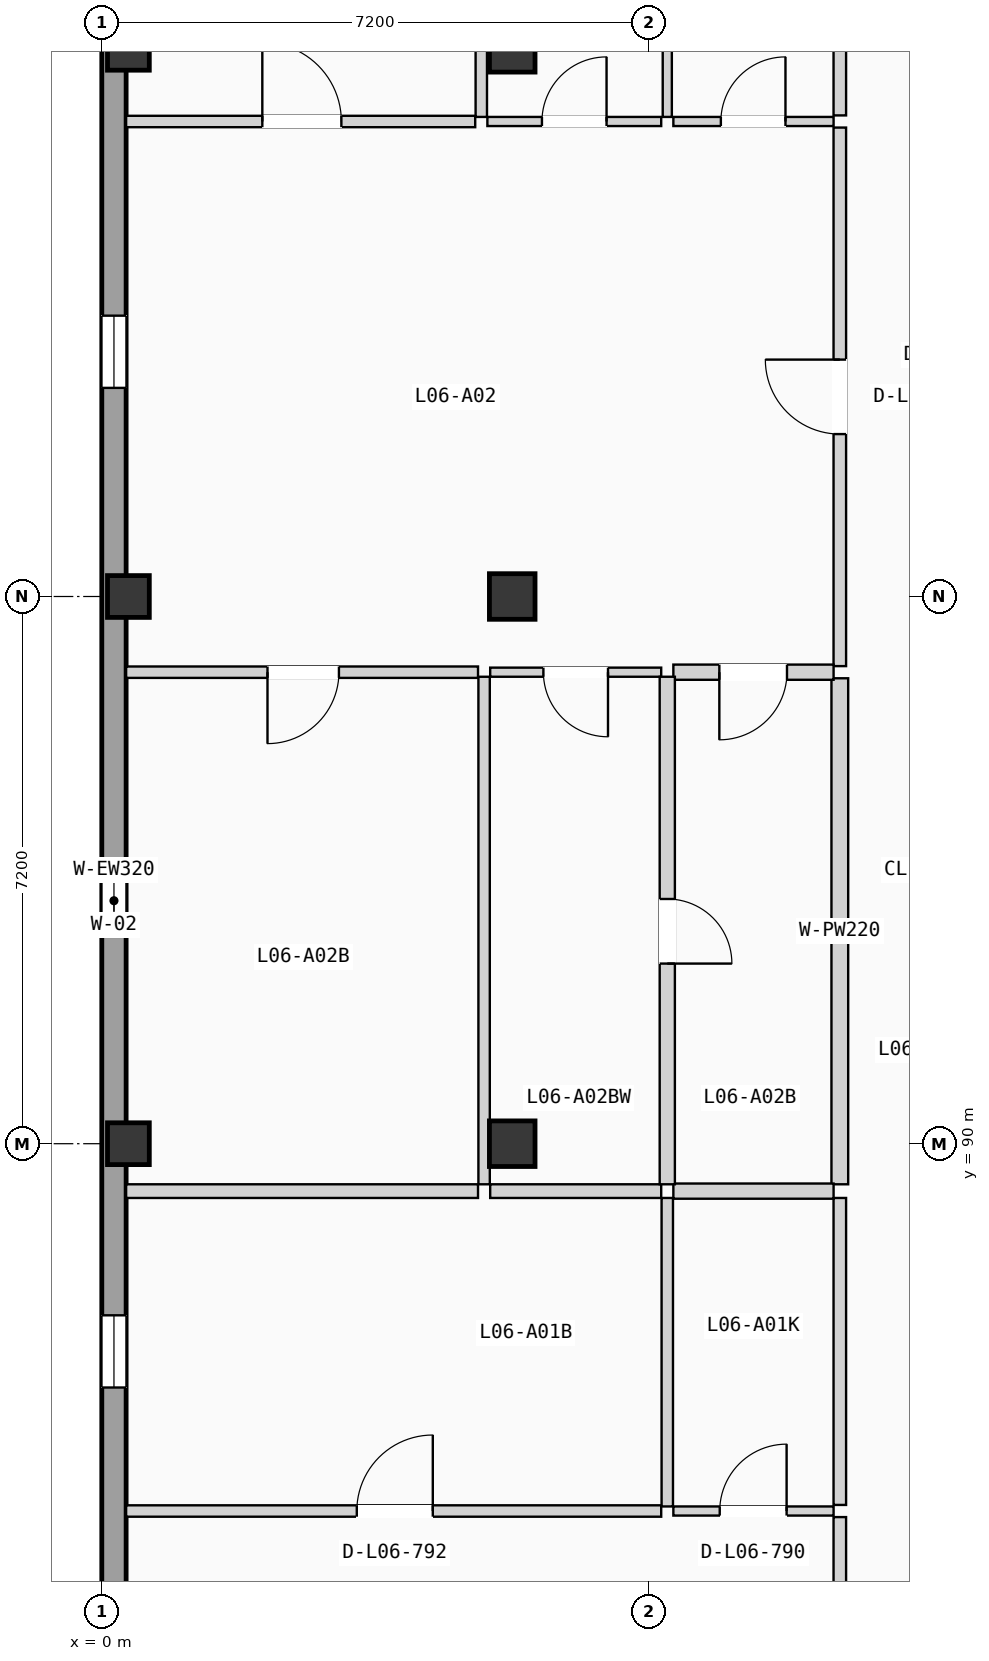
"""IFC4 building model, lengths in metres.
Left out: names, types, materials, properties, quantities, classifications, styles, units other than length and angle.
Written with IfcOpenShell. Run it as: python <this file> out.ifc"""

import sys

from ifc_helpers import new_model, si_unit, direction, frame, frame_2d, origin, origin_2d, place, context, subcontext, project, spatial, rectangle, extrude, element, fill, save


model = new_model("IFC4")
c1 = context("Model", 3, precision=1e-05, world=origin(), true_north=direction((0.0, 1.0)))
c2 = subcontext(c1, "Body", "Model", "MODEL_VIEW")
j1 = project(units=[si_unit("LENGTHUNIT", "METRE"), si_unit("PLANEANGLEUNIT", "RADIAN")], contexts=[c1])
p1 = place(None, origin())
s1 = spatial("IfcSite", under=j1, at=p1, CompositionType="ELEMENT")
p2 = place(p1, origin())
s2 = spatial("IfcBuilding", under=s1, at=p2, CompositionType="ELEMENT")
p3 = place(p2, frame((0.0, 0.0, 21.525)))
s3 = spatial("IfcBuildingStorey", under=s2, at=p3, CompositionType="ELEMENT", Elevation=21.525)
for number, where, z_axis, x_axis in (
    (1, (0.35, 90.0, 0.0), (0.0, 0.0, 1.0), (1.0, 0.0, 0.0)),
    (2, (0.35, 97.2, 0.0), (0.0, 0.0, 1.0), (1.0, 0.0, 0.0)),
    (3, (0.35, 104.4, 0.0), (0.0, 0.0, 1.0), (1.0, 0.0, 0.0)),
):
    element("IfcColumn", number, at=place(p3, frame(where, z_axis=z_axis, x_axis=x_axis)), inside=s3, PredefinedType="COLUMN", context=c2, shape_type="SweptSolid", body=[
        extrude(rectangle(XDim=0.55, YDim=0.55, at=origin_2d()), origin(), (0.0, 0.0, 1.0), 3.15),
    ])
for number, where, z_axis, x_axis in (
    (4, (5.4, 90.0, 0.0), (0.0, 0.0, 1.0), (1.0, 0.0, 0.0)),
    (5, (5.4, 97.2, 0.0), (0.0, 0.0, 1.0), (1.0, 0.0, 0.0)),
    (6, (5.4, 104.4, 0.0), (0.0, 0.0, 1.0), (1.0, 0.0, 0.0)),
):
    element("IfcColumn", number, at=place(p3, frame(where, z_axis=z_axis, x_axis=x_axis)), inside=s3, PredefinedType="COLUMN", context=c2, shape_type="SweptSolid", body=[
        extrude(rectangle(XDim=0.6, YDim=0.6, at=origin_2d()), origin(), (0.0, 0.0, 1.0), 3.15),
    ])
p4 = place(p3, frame((0.16, 68.72, 0.0), z_axis=(0.0, 0.0, 1.0), x_axis=(0.0, 1.0, 0.0)))
e7 = element("IfcWall", 7, at=p4, inside=s3, PredefinedType="SOLIDWALL", context=c2, shape_type="SweptSolid", body=[
    extrude(rectangle(XDim=49.76, YDim=0.32, at=frame_2d((24.88, 0.0))), origin(), (0.0, 0.0, 1.0), 2.89),
])
p5 = place(p4, frame((12.169, 0.0, 0.85)))
e8 = element("IfcOpeningElement", 8, at=p5, cuts=e7, PredefinedType="OPENING", context=c2, shape_type="SweptSolid", body=[
    extrude(rectangle(XDim=0.95, YDim=1.2, at=frame_2d((0.475, 0.6))), frame((0.0, 0.17, 0.0), z_axis=(0.0, -1.0, 0.0), x_axis=(1.0, 0.0, 0.0)), (0.0, 0.0, 1.0), 0.34),
])
p6 = place(p4, frame((8.149, 0.0, 0.555)))
e9 = element("IfcOpeningElement", 9, at=p6, cuts=e7, PredefinedType="OPENING", context=c2, shape_type="SweptSolid", body=[
    extrude(rectangle(XDim=2.3, YDim=1.65, at=frame_2d((1.15, 0.825))), frame((0.0, 0.17, 0.0), z_axis=(0.0, -1.0, 0.0), x_axis=(1.0, 0.0, 0.0)), (0.0, 0.0, 1.0), 0.34),
])
p7 = place(p4, frame((18.072, 0.0, 0.85)))
e10 = element("IfcOpeningElement", 10, at=p7, cuts=e7, PredefinedType="OPENING", context=c2, shape_type="SweptSolid", body=[
    extrude(rectangle(XDim=0.95, YDim=1.2, at=frame_2d((0.475, 0.6))), frame((0.0, 0.17, 0.0), z_axis=(0.0, -1.0, 0.0), x_axis=(1.0, 0.0, 0.0)), (0.0, 0.0, 1.0), 0.34),
])
p8 = place(p4, frame((31.225, 0.0, 0.9)))
e11 = element("IfcOpeningElement", 11, at=p8, cuts=e7, PredefinedType="OPENING", context=c2, shape_type="SweptSolid", body=[
    extrude(rectangle(XDim=0.95, YDim=1.2, at=frame_2d((0.475, 0.6))), frame((0.0, 0.17, 0.0), z_axis=(0.0, -1.0, 0.0), x_axis=(1.0, 0.0, 0.0)), (0.0, 0.0, 1.0), 0.34),
])
p9 = place(p4, frame((24.002, 0.0, 0.855)))
e12 = element("IfcOpeningElement", 12, at=p9, cuts=e7, PredefinedType="OPENING", context=c2, shape_type="SweptSolid", body=[
    extrude(rectangle(XDim=0.95, YDim=1.35, at=frame_2d((0.475, 0.675))), frame((0.0, 0.17, 0.0), z_axis=(0.0, -1.0, 0.0), x_axis=(1.0, 0.0, 0.0)), (0.0, 0.0, 1.0), 0.34),
])
p10 = place(p4, frame((38.74, 0.0, 0.705)))
e13 = element("IfcOpeningElement", 13, at=p10, cuts=e7, PredefinedType="OPENING", context=c2, shape_type="SweptSolid", body=[
    extrude(rectangle(XDim=0.95, YDim=1.5, at=frame_2d((0.475, 0.75))), frame((0.0, 0.17, 0.0), z_axis=(0.0, -1.0, 0.0), x_axis=(1.0, 0.0, 0.0)), (0.0, 0.0, 1.0), 0.34),
])
p11 = place(p3, frame((9.71, 80.199, 0.0), z_axis=(0.0, 0.0, 1.0), x_axis=(0.0, 1.0, 0.0)))
e14 = element("IfcWall", 14, at=p11, inside=s3, PredefinedType="PARTITIONING", context=c2, shape_type="SweptSolid", body=[
    extrude(rectangle(XDim=4.888, YDim=0.165, at=frame_2d((2.444, 0.0))), origin(), (0.0, 0.0, 1.0), 2.87),
])
p12 = place(p11, frame((1.954, 0.0, 0.0)))
e15 = element("IfcOpeningElement", 15, at=p12, cuts=e14, PredefinedType="OPENING", context=c2, shape_type="SweptSolid", body=[
    extrude(rectangle(XDim=0.98, YDim=2.08, at=frame_2d((0.49, 1.04))), frame((0.0, 0.093, 0.0), z_axis=(0.0, -1.0, 0.0), x_axis=(1.0, 0.0, 0.0)), (0.0, 0.0, 1.0), 0.185),
])
p13 = place(p3, frame((9.71, 85.247, 0.0), z_axis=(0.0, 0.0, 1.0), x_axis=(0.0, 1.0, 0.0)))
e16 = element("IfcWall", 16, at=p13, inside=s3, PredefinedType="PARTITIONING", context=c2, shape_type="SweptSolid", body=[
    extrude(rectangle(XDim=4.039, YDim=0.165, at=frame_2d((2.02, 0.0))), origin(), (0.0, 0.0, 1.0), 2.87),
])
p14 = place(p3, frame((9.71, 96.284, 0.0), z_axis=(0.0, 0.0, 1.0), x_axis=(0.0, 1.0, 0.0)))
e17 = element("IfcWall", 17, at=p14, inside=s3, PredefinedType="PARTITIONING", context=c2, shape_type="SweptSolid", body=[
    extrude(rectangle(XDim=7.086, YDim=0.165, at=frame_2d((3.543, 0.0))), origin(), (0.0, 0.0, 1.0), 2.87),
])
p15 = place(p14, frame((3.053, 0.0, 0.0)))
e18 = element("IfcOpeningElement", 18, at=p15, cuts=e17, PredefinedType="OPENING", context=c2, shape_type="SweptSolid", body=[
    extrude(rectangle(XDim=0.98, YDim=2.08, at=frame_2d((0.49, 1.04))), frame((0.0, 0.093, 0.0), z_axis=(0.0, -1.0, 0.0), x_axis=(1.0, 0.0, 0.0)), (0.0, 0.0, 1.0), 0.185),
])
p16 = place(p3, frame((9.71, 89.466, 0.0), z_axis=(0.0, 0.0, 1.0), x_axis=(0.0, 1.0, 0.0)))
e19 = element("IfcWall", 19, at=p16, inside=s3, PredefinedType="PLUMBINGWALL", context=c2, shape_type="SweptSolid", body=[
    extrude(rectangle(XDim=6.658, YDim=0.22, at=frame_2d((3.329, 0.0))), origin(), (0.0, 0.0, 1.0), 2.87),
])
p17 = place(p3, frame((9.71, 103.53, 0.0), z_axis=(0.0, 0.0, 1.0), x_axis=(0.0, 1.0, 0.0)))
e20 = element("IfcWall", 20, at=p17, inside=s3, PredefinedType="PARTITIONING", context=c2, shape_type="SweptSolid", body=[
    extrude(rectangle(XDim=7.67, YDim=0.165, at=frame_2d((3.835, 0.0))), origin(), (0.0, 0.0, 1.0), 2.87),
])
p18 = place(p3, frame((7.52, 85.167, 0.0), z_axis=(0.0, 0.0, 1.0), x_axis=(1.0, 0.0, 0.0)))
e21 = element("IfcWall", 21, at=p18, inside=s3, PredefinedType="PARTITIONING", context=c2, shape_type="SweptSolid", body=[
    extrude(rectangle(XDim=2.108, YDim=0.12, at=frame_2d((1.054, 0.0))), origin(), (0.0, 0.0, 1.0), 2.87),
])
p19 = place(p18, frame((0.61, 0.0, 0.0)))
e22 = element("IfcOpeningElement", 22, at=p19, cuts=e21, PredefinedType="OPENING", context=c2, shape_type="SweptSolid", body=[
    extrude(rectangle(XDim=0.88, YDim=2.02, at=frame_2d((0.44, 1.01))), frame((0.0, 0.07, 0.0), z_axis=(0.0, -1.0, 0.0), x_axis=(1.0, 0.0, 0.0)), (0.0, 0.0, 1.0), 0.14),
])
p20 = place(p3, frame((0.32, 85.167, 0.0), z_axis=(0.0, 0.0, 1.0), x_axis=(1.0, 0.0, 0.0)))
e23 = element("IfcWall", 23, at=p20, inside=s3, PredefinedType="PARTITIONING", context=c2, shape_type="SweptSolid", body=[
    extrude(rectangle(XDim=7.04, YDim=0.15, at=frame_2d((3.52, 0.0))), origin(), (0.0, 0.0, 1.0), 2.87),
])
p21 = place(p20, frame((3.035, 0.0, 0.0)))
e24 = element("IfcOpeningElement", 24, at=p21, cuts=e23, PredefinedType="OPENING", context=c2, shape_type="SweptSolid", body=[
    extrude(rectangle(XDim=1.0, YDim=2.06, at=frame_2d((0.5, 1.03))), frame((0.0, 0.085, 0.0), z_axis=(0.0, -1.0, 0.0), x_axis=(1.0, 0.0, 0.0)), (0.0, 0.0, 1.0), 0.17),
])
p22 = place(p3, frame((7.44, 85.227, 0.0), z_axis=(0.0, 0.0, 1.0), x_axis=(0.0, 1.0, 0.0)))
e25 = element("IfcWall", 25, at=p22, inside=s3, PredefinedType="PARTITIONING", context=c2, shape_type="SweptSolid", body=[
    extrude(rectangle(XDim=4.059, YDim=0.15, at=frame_2d((2.029, 0.0))), origin(), (0.0, 0.0, 1.0), 2.87),
])
p23 = place(p3, frame((7.52, 89.376, 0.0), z_axis=(0.0, 0.0, 1.0), x_axis=(1.0, 0.0, 0.0)))
e26 = element("IfcWall", 26, at=p23, inside=s3, PredefinedType="PLUMBINGWALL", context=c2, shape_type="SweptSolid", body=[
    extrude(rectangle(XDim=2.108, YDim=0.2, at=frame_2d((1.054, 0.0))), origin(), (0.0, 0.0, 1.0), 2.87),
])
p24 = place(p3, frame((0.32, 89.376, 0.0), z_axis=(0.0, 0.0, 1.0), x_axis=(1.0, 0.0, 0.0)))
e27 = element("IfcWall", 27, at=p24, inside=s3, PredefinedType="PARTITIONING", context=c2, shape_type="SweptSolid", body=[
    extrude(rectangle(XDim=4.63, YDim=0.18, at=frame_2d((2.315, 0.0))), origin(), (0.0, 0.0, 1.0), 2.87),
])
p25 = place(p3, frame((5.11, 89.376, 0.0), z_axis=(0.0, 0.0, 1.0), x_axis=(1.0, 0.0, 0.0)))
e28 = element("IfcWall", 28, at=p25, inside=s3, PredefinedType="PARTITIONING", context=c2, shape_type="SweptSolid", body=[
    extrude(rectangle(XDim=2.25, YDim=0.18, at=frame_2d((1.125, 0.0))), origin(), (0.0, 0.0, 1.0), 2.87),
])
p26 = place(p3, frame((7.52, 96.204, 0.0), z_axis=(0.0, 0.0, 1.0), x_axis=(1.0, 0.0, 0.0)))
e29 = element("IfcWall", 29, at=p26, inside=s3, PredefinedType="PLUMBINGWALL", context=c2, shape_type="SweptSolid", body=[
    extrude(rectangle(XDim=2.108, YDim=0.2, at=frame_2d((1.054, 0.0))), origin(), (0.0, 0.0, 1.0), 2.87),
])
p27 = place(p26, frame((0.605, 0.0, 0.0)))
e30 = element("IfcOpeningElement", 30, at=p27, cuts=e29, PredefinedType="OPENING", context=c2, shape_type="SweptSolid", body=[
    extrude(rectangle(XDim=0.89, YDim=2.03, at=frame_2d((0.445, 1.015))), frame((0.0, 0.11, 0.0), z_axis=(0.0, -1.0, 0.0), x_axis=(1.0, 0.0, 0.0)), (0.0, 0.0, 1.0), 0.22),
])
p28 = place(p3, frame((7.52, 103.45, 0.0), z_axis=(0.0, 0.0, 1.0), x_axis=(1.0, 0.0, 0.0)))
e31 = element("IfcWall", 31, at=p28, inside=s3, PredefinedType="PARTITIONING", context=c2, shape_type="SweptSolid", body=[
    extrude(rectangle(XDim=2.108, YDim=0.12, at=frame_2d((1.054, 0.0))), origin(), (0.0, 0.0, 1.0), 2.87),
])
p29 = place(p28, frame((0.625, 0.0, 0.0)))
e32 = element("IfcOpeningElement", 32, at=p29, cuts=e31, PredefinedType="OPENING", context=c2, shape_type="SweptSolid", body=[
    extrude(rectangle(XDim=0.85, YDim=2.01, at=frame_2d((0.425, 1.005))), frame((0.0, 0.07, 0.0), z_axis=(0.0, -1.0, 0.0), x_axis=(1.0, 0.0, 0.0)), (0.0, 0.0, 1.0), 0.14),
])
p30 = place(p3, frame((0.32, 96.204, 0.0), z_axis=(0.0, 0.0, 1.0), x_axis=(1.0, 0.0, 0.0)))
e33 = element("IfcWall", 33, at=p30, inside=s3, PredefinedType="PARTITIONING", context=c2, shape_type="SweptSolid", body=[
    extrude(rectangle(XDim=4.63, YDim=0.15, at=frame_2d((2.315, 0.0))), origin(), (0.0, 0.0, 1.0), 2.87),
])
p31 = place(p30, frame((1.86, 0.0, 0.0)))
e34 = element("IfcOpeningElement", 34, at=p31, cuts=e33, PredefinedType="OPENING", context=c2, shape_type="SweptSolid", body=[
    extrude(rectangle(XDim=0.94, YDim=2.06, at=frame_2d((0.47, 1.03))), frame((0.0, 0.085, 0.0), z_axis=(0.0, -1.0, 0.0), x_axis=(1.0, 0.0, 0.0)), (0.0, 0.0, 1.0), 0.17),
])
p32 = place(p3, frame((5.11, 96.204, 0.0), z_axis=(0.0, 0.0, 1.0), x_axis=(1.0, 0.0, 0.0)))
e35 = element("IfcWall", 35, at=p32, inside=s3, PredefinedType="PARTITIONING", context=c2, shape_type="SweptSolid", body=[
    extrude(rectangle(XDim=2.25, YDim=0.12, at=frame_2d((1.125, 0.0))), origin(), (0.0, 0.0, 1.0), 2.87),
])
p33 = place(p32, frame((0.7, 0.0, 0.0)))
e36 = element("IfcOpeningElement", 36, at=p33, cuts=e35, PredefinedType="OPENING", context=c2, shape_type="SweptSolid", body=[
    extrude(rectangle(XDim=0.85, YDim=2.01, at=frame_2d((0.425, 1.005))), frame((0.0, 0.07, 0.0), z_axis=(0.0, -1.0, 0.0), x_axis=(1.0, 0.0, 0.0)), (0.0, 0.0, 1.0), 0.14),
])
p34 = place(p3, frame((0.32, 103.45, 0.0), z_axis=(0.0, 0.0, 1.0), x_axis=(1.0, 0.0, 0.0)))
e37 = element("IfcWall", 37, at=p34, inside=s3, PredefinedType="PARTITIONING", context=c2, shape_type="SweptSolid", body=[
    extrude(rectangle(XDim=4.593, YDim=0.15, at=frame_2d((2.296, 0.0))), origin(), (0.0, 0.0, 1.0), 2.87),
])
p35 = place(p34, frame((1.792, 0.0, 0.0)))
e38 = element("IfcOpeningElement", 38, at=p35, cuts=e37, PredefinedType="OPENING", context=c2, shape_type="SweptSolid", body=[
    extrude(rectangle(XDim=1.04, YDim=2.08, at=frame_2d((0.52, 1.04))), frame((0.0, 0.085, 0.0), z_axis=(0.0, -1.0, 0.0), x_axis=(1.0, 0.0, 0.0)), (0.0, 0.0, 1.0), 0.17),
])
p36 = place(p3, frame((5.073, 103.45, 0.0), z_axis=(0.0, 0.0, 1.0), x_axis=(1.0, 0.0, 0.0)))
e39 = element("IfcWall", 39, at=p36, inside=s3, PredefinedType="PARTITIONING", context=c2, shape_type="SweptSolid", body=[
    extrude(rectangle(XDim=2.287, YDim=0.12, at=frame_2d((1.144, 0.0))), origin(), (0.0, 0.0, 1.0), 2.87),
])
p37 = place(p36, frame((0.718, 0.0, 0.0)))
e40 = element("IfcOpeningElement", 40, at=p37, cuts=e39, PredefinedType="OPENING", context=c2, shape_type="SweptSolid", body=[
    extrude(rectangle(XDim=0.85, YDim=2.01, at=frame_2d((0.425, 1.005))), frame((0.0, 0.07, 0.0), z_axis=(0.0, -1.0, 0.0), x_axis=(1.0, 0.0, 0.0)), (0.0, 0.0, 1.0), 0.14),
])
p38 = place(p3, frame((7.44, 89.466, 0.0), z_axis=(0.0, 0.0, 1.0), x_axis=(0.0, 1.0, 0.0)))
e41 = element("IfcWall", 41, at=p38, inside=s3, PredefinedType="PLUMBINGWALL", context=c2, shape_type="SweptSolid", body=[
    extrude(rectangle(XDim=6.678, YDim=0.2, at=frame_2d((3.339, 0.0))), origin(), (0.0, 0.0, 1.0), 2.87),
])
p39 = place(p38, frame((2.904, 0.0, 0.0)))
e42 = element("IfcOpeningElement", 42, at=p39, cuts=e41, PredefinedType="OPENING", context=c2, shape_type="SweptSolid", body=[
    extrude(rectangle(XDim=0.85, YDim=2.01, at=frame_2d((0.425, 1.005))), frame((0.0, 0.11, 0.0), z_axis=(0.0, -1.0, 0.0), x_axis=(1.0, 0.0, 0.0)), (0.0, 0.0, 1.0), 0.22),
])
p40 = place(p3, frame((7.44, 103.51, 0.0), z_axis=(0.0, 0.0, 1.0), x_axis=(0.0, 1.0, 0.0)))
e43 = element("IfcWall", 43, at=p40, inside=s3, PredefinedType="PARTITIONING", context=c2, shape_type="SweptSolid", body=[
    extrude(rectangle(XDim=7.69, YDim=0.12, at=frame_2d((3.845, 0.0))), origin(), (0.0, 0.0, 1.0), 2.87),
])
p41 = place(p3, frame((5.03, 89.466, 0.0), z_axis=(0.0, 0.0, 1.0), x_axis=(0.0, 1.0, 0.0)))
e44 = element("IfcWall", 44, at=p41, inside=s3, PredefinedType="PARTITIONING", context=c2, shape_type="SweptSolid", body=[
    extrude(rectangle(XDim=6.678, YDim=0.15, at=frame_2d((3.339, 0.0))), origin(), (0.0, 0.0, 1.0), 2.87),
])
p42 = place(p3, frame((4.993, 103.51, 0.0), z_axis=(0.0, 0.0, 1.0), x_axis=(0.0, 1.0, 0.0)))
e45 = element("IfcWall", 45, at=p42, inside=s3, PredefinedType="PARTITIONING", context=c2, shape_type="SweptSolid", body=[
    extrude(rectangle(XDim=7.69, YDim=0.15, at=frame_2d((3.845, 0.0))), origin(), (0.0, 0.0, 1.0), 2.87),
])
p43 = place(p7, origin())
e46 = element("IfcWindow", 46, at=p43, inside=s3, PartitioningType="SINGLE_PANEL", PredefinedType="WINDOW", context=c2, shape_type="SweptSolid", body=[
    extrude(rectangle(XDim=0.95, YDim=1.2, at=frame_2d((0.475, 0.6))), frame((0.0, 0.03, 0.0), z_axis=(0.0, -1.0, 0.0), x_axis=(1.0, 0.0, 0.0)), (0.0, 0.0, 1.0), 0.06),
])
fill(e10, e46)
p44 = place(p8, origin())
e47 = element("IfcWindow", 47, at=p44, inside=s3, PartitioningType="SINGLE_PANEL", PredefinedType="WINDOW", context=c2, shape_type="SweptSolid", body=[
    extrude(rectangle(XDim=0.95, YDim=1.2, at=frame_2d((0.475, 0.6))), frame((0.0, 0.03, 0.0), z_axis=(0.0, -1.0, 0.0), x_axis=(1.0, 0.0, 0.0)), (0.0, 0.0, 1.0), 0.06),
])
fill(e11, e47)
p45 = place(p9, origin())
e48 = element("IfcWindow", 48, at=p45, inside=s3, PartitioningType="SINGLE_PANEL", PredefinedType="WINDOW", context=c2, shape_type="SweptSolid", body=[
    extrude(rectangle(XDim=0.95, YDim=1.35, at=frame_2d((0.475, 0.675))), frame((0.0, 0.03, 0.0), z_axis=(0.0, -1.0, 0.0), x_axis=(1.0, 0.0, 0.0)), (0.0, 0.0, 1.0), 0.06),
])
fill(e12, e48)
p46 = place(p15, origin())
e49 = element("IfcDoor", 49, at=p46, inside=s3, OperationType="SINGLE_SWING_RIGHT", PredefinedType="DOOR", context=c2, shape_type="SweptSolid", body=[
    extrude(rectangle(XDim=0.98, YDim=2.08, at=frame_2d((0.49, 1.04))), frame((0.0, 0.025, 0.0), z_axis=(0.0, -1.0, 0.0), x_axis=(1.0, 0.0, 0.0)), (0.0, 0.0, 1.0), 0.05),
])
fill(e18, e49)
p47 = place(p19, origin())
e50 = element("IfcDoor", 50, at=p47, inside=s3, OperationType="SINGLE_SWING_RIGHT", PredefinedType="DOOR", context=c2, shape_type="SweptSolid", body=[
    extrude(rectangle(XDim=0.88, YDim=2.02, at=frame_2d((0.44, 1.01))), frame((0.0, 0.025, 0.0), z_axis=(0.0, -1.0, 0.0), x_axis=(1.0, 0.0, 0.0)), (0.0, 0.0, 1.0), 0.05),
])
fill(e22, e50)
p48 = place(p21, origin())
e51 = element("IfcDoor", 51, at=p48, inside=s3, OperationType="SINGLE_SWING_RIGHT", PredefinedType="DOOR", context=c2, shape_type="SweptSolid", body=[
    extrude(rectangle(XDim=1.0, YDim=2.06, at=frame_2d((0.5, 1.03))), frame((0.0, 0.025, 0.0), z_axis=(0.0, -1.0, 0.0), x_axis=(1.0, 0.0, 0.0)), (0.0, 0.0, 1.0), 0.05),
])
fill(e24, e51)
p49 = place(p27, frame((0.89, 0.0, 0.0), z_axis=(0.0, 0.0, 1.0), x_axis=(-1.0, 0.0, 0.0)))
e52 = element("IfcDoor", 52, at=p49, inside=s3, OperationType="SINGLE_SWING_LEFT", PredefinedType="DOOR", context=c2, shape_type="SweptSolid", body=[
    extrude(rectangle(XDim=0.89, YDim=2.03, at=frame_2d((0.445, 1.015))), frame((0.0, 0.025, 0.0), z_axis=(0.0, -1.0, 0.0), x_axis=(1.0, 0.0, 0.0)), (0.0, 0.0, 1.0), 0.05),
])
fill(e30, e52)
p50 = place(p29, origin())
e53 = element("IfcDoor", 53, at=p50, inside=s3, OperationType="SINGLE_SWING_RIGHT", PredefinedType="DOOR", context=c2, shape_type="SweptSolid", body=[
    extrude(rectangle(XDim=0.85, YDim=2.01, at=frame_2d((0.425, 1.005))), frame((0.0, 0.025, 0.0), z_axis=(0.0, -1.0, 0.0), x_axis=(1.0, 0.0, 0.0)), (0.0, 0.0, 1.0), 0.05),
])
fill(e32, e53)
p51 = place(p31, frame((0.94, 0.0, 0.0), z_axis=(0.0, 0.0, 1.0), x_axis=(-1.0, 0.0, 0.0)))
e54 = element("IfcDoor", 54, at=p51, inside=s3, OperationType="SINGLE_SWING_LEFT", PredefinedType="DOOR", context=c2, shape_type="SweptSolid", body=[
    extrude(rectangle(XDim=0.94, YDim=2.06, at=frame_2d((0.47, 1.03))), frame((0.0, 0.025, 0.0), z_axis=(0.0, -1.0, 0.0), x_axis=(1.0, 0.0, 0.0)), (0.0, 0.0, 1.0), 0.05),
])
fill(e34, e54)
p52 = place(p33, frame((0.85, 0.0, 0.0), z_axis=(0.0, 0.0, 1.0), x_axis=(-1.0, 0.0, 0.0)))
e55 = element("IfcDoor", 55, at=p52, inside=s3, OperationType="SINGLE_SWING_RIGHT", PredefinedType="DOOR", context=c2, shape_type="SweptSolid", body=[
    extrude(rectangle(XDim=0.85, YDim=2.01, at=frame_2d((0.425, 1.005))), frame((0.0, 0.025, 0.0), z_axis=(0.0, -1.0, 0.0), x_axis=(1.0, 0.0, 0.0)), (0.0, 0.0, 1.0), 0.05),
])
fill(e36, e55)
p53 = place(p35, origin())
e56 = element("IfcDoor", 56, at=p53, inside=s3, OperationType="SINGLE_SWING_LEFT", PredefinedType="DOOR", context=c2, shape_type="SweptSolid", body=[
    extrude(rectangle(XDim=1.04, YDim=2.08, at=frame_2d((0.52, 1.04))), frame((0.0, 0.025, 0.0), z_axis=(0.0, -1.0, 0.0), x_axis=(1.0, 0.0, 0.0)), (0.0, 0.0, 1.0), 0.05),
])
fill(e38, e56)
p54 = place(p37, origin())
e57 = element("IfcDoor", 57, at=p54, inside=s3, OperationType="SINGLE_SWING_RIGHT", PredefinedType="DOOR", context=c2, shape_type="SweptSolid", body=[
    extrude(rectangle(XDim=0.85, YDim=2.01, at=frame_2d((0.425, 1.005))), frame((0.0, 0.025, 0.0), z_axis=(0.0, -1.0, 0.0), x_axis=(1.0, 0.0, 0.0)), (0.0, 0.0, 1.0), 0.05),
])
fill(e40, e57)
p55 = place(p39, frame((0.85, 0.0, 0.0), z_axis=(0.0, 0.0, 1.0), x_axis=(-1.0, 0.0, 0.0)))
e58 = element("IfcDoor", 58, at=p55, inside=s3, OperationType="SINGLE_SWING_LEFT", PredefinedType="DOOR", context=c2, shape_type="SweptSolid", body=[
    extrude(rectangle(XDim=0.85, YDim=2.01, at=frame_2d((0.425, 1.005))), frame((0.0, 0.025, 0.0), z_axis=(0.0, -1.0, 0.0), x_axis=(1.0, 0.0, 0.0)), (0.0, 0.0, 1.0), 0.05),
])
fill(e42, e58)
save(model, sys.argv[1])
